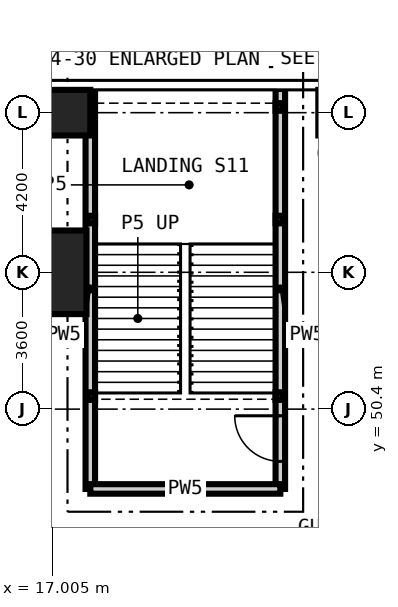
"""IFC4 building model, lengths in metres.
Left out: names, types, materials, properties, quantities, classifications, styles, units other than length and angle.
Written with IfcOpenShell. Run it as: python <this file> out.ifc"""

import sys

from ifc_helpers import new_model, si_unit, direction, frame, frame_2d, origin, origin_2d, place, context, subcontext, project, spatial, rectangle, hollow_rectangle, extrude, element, fill, save


model = new_model("IFC4")
c1 = context("Model", 3, precision=1e-05, world=origin(), true_north=direction((0.0, 1.0)))
c2 = subcontext(c1, "Body", "Model", "MODEL_VIEW")
j1 = project(units=[si_unit("LENGTHUNIT", "METRE"), si_unit("PLANEANGLEUNIT", "RADIAN")], contexts=[c1])
p1 = place(None, origin())
s1 = spatial("IfcSite", under=j1, at=p1, CompositionType="ELEMENT")
p2 = place(p1, origin())
s2 = spatial("IfcBuilding", under=s1, at=p2, CompositionType="ELEMENT")
p3 = place(p2, frame((0.0, 0.0, 17.0)))
s3 = spatial("IfcBuildingStorey", under=s2, at=p3, CompositionType="ELEMENT", Elevation=17.0)
p4 = place(p3, frame((16.8, 54.0, -0.3), z_axis=(0.0, 0.0, 1.0), x_axis=(1.0, 0.0, 0.0)))
e1 = element("IfcColumn", 1, at=p4, inside=s3, PredefinedType="COLUMN", context=c2, shape_type="SweptSolid", body=[
    extrude(rectangle(XDim=2.2, YDim=2.2, at=origin_2d()), origin(), (0.0, 0.0, 1.0), 4.95),
])
p5 = place(p3, frame((16.8, 58.2, -0.3), z_axis=(0.0, 0.0, 1.0), x_axis=(1.0, 0.0, 0.0)))
e2 = element("IfcColumn", 2, at=p5, inside=s3, PredefinedType="COLUMN", context=c2, shape_type="SweptSolid", body=[
    extrude(rectangle(XDim=2.4, YDim=1.2, at=origin_2d()), origin(), (0.0, 0.0, 1.0), 4.95),
])
p6 = place(p3, frame((18.0, 48.3, 0.0), z_axis=(0.0, 0.0, 1.0), x_axis=(0.0, 1.0, 0.0)))
e3 = element("IfcWall", 3, at=p6, inside=s3, PredefinedType="PARTITIONING", context=c2, shape_type="SweptSolid", body=[
    extrude(rectangle(XDim=10.523, YDim=0.25, at=frame_2d((5.261, 0.0))), origin(), (0.0, 0.0, 1.0), 4.65),
])
p7 = place(p3, frame((23.0, 48.3, 0.0), z_axis=(0.0, 0.0, 1.0), x_axis=(0.0, 1.0, 0.0)))
e4 = element("IfcWall", 4, at=p7, inside=s3, PredefinedType="PARTITIONING", context=c2, shape_type="SweptSolid", body=[
    extrude(rectangle(XDim=10.523, YDim=0.25, at=frame_2d((5.261, 0.0))), origin(), (0.0, 0.0, 1.0), 4.65),
])
p8 = place(p7, frame((0.725, 0.0, 0.0)))
e5 = element("IfcOpeningElement", 5, at=p8, cuts=e4, PredefinedType="OPENING", context=c2, shape_type="SweptSolid", body=[
    extrude(rectangle(XDim=1.2, YDim=2.2, at=frame_2d((0.6, 1.1))), frame((0.0, 0.135, 0.0), z_axis=(0.0, -1.0, 0.0), x_axis=(1.0, 0.0, 0.0)), (0.0, 0.0, 1.0), 0.27),
])
p9 = place(p3, frame((18.0, 48.3, 0.0), z_axis=(0.0, 0.0, 1.0), x_axis=(1.0, 0.0, 0.0)))
e6 = element("IfcWall", 6, at=p9, inside=s3, PredefinedType="PARTITIONING", context=c2, shape_type="SweptSolid", body=[
    extrude(rectangle(XDim=5.0, YDim=0.25, at=frame_2d((2.5, 0.0))), origin(), (0.0, 0.0, 1.0), 4.65),
])
for number, where, z_axis, x_axis in (
    (7, (18.025, 50.742, -0.3), (0.0, 0.0, 1.0), (1.0, 0.0, 0.0)),
    (8, (22.975, 50.742, -0.3), (0.0, 0.0, 1.0), (1.0, 0.0, 0.0)),
    (9, (18.025, 55.387, -0.3), (0.0, 0.0, 1.0), (1.0, 0.0, 0.0)),
    (10, (22.975, 55.387, -0.3), (0.0, 0.0, 1.0), (1.0, 0.0, 0.0)),
    (11, (22.975, 58.35, -0.3), (0.0, 0.0, 1.0), (1.0, 0.0, 0.0)),
):
    element("IfcColumn", number, at=place(p3, frame(where, z_axis=z_axis, x_axis=x_axis)), inside=s3, PredefinedType="COLUMN", context=c2, shape_type="SweptSolid", body=[
        extrude(hollow_rectangle(XDim=0.2, YDim=0.2, WallThickness=0.01, at=origin_2d()), origin(), (0.0, 0.0, 1.0), 4.95),
    ])
p10 = place(p8, origin())
e12 = element("IfcDoor", 12, at=p10, inside=s3, OperationType="SINGLE_SWING_RIGHT", PredefinedType="DOOR", context=c2, shape_type="SweptSolid", body=[
    extrude(rectangle(XDim=1.2, YDim=2.2, at=frame_2d((0.6, 1.1))), frame((0.0, 0.025, 0.0), z_axis=(0.0, -1.0, 0.0), x_axis=(1.0, 0.0, 0.0)), (0.0, 0.0, 1.0), 0.05),
])
fill(e5, e12)
save(model, sys.argv[1])
